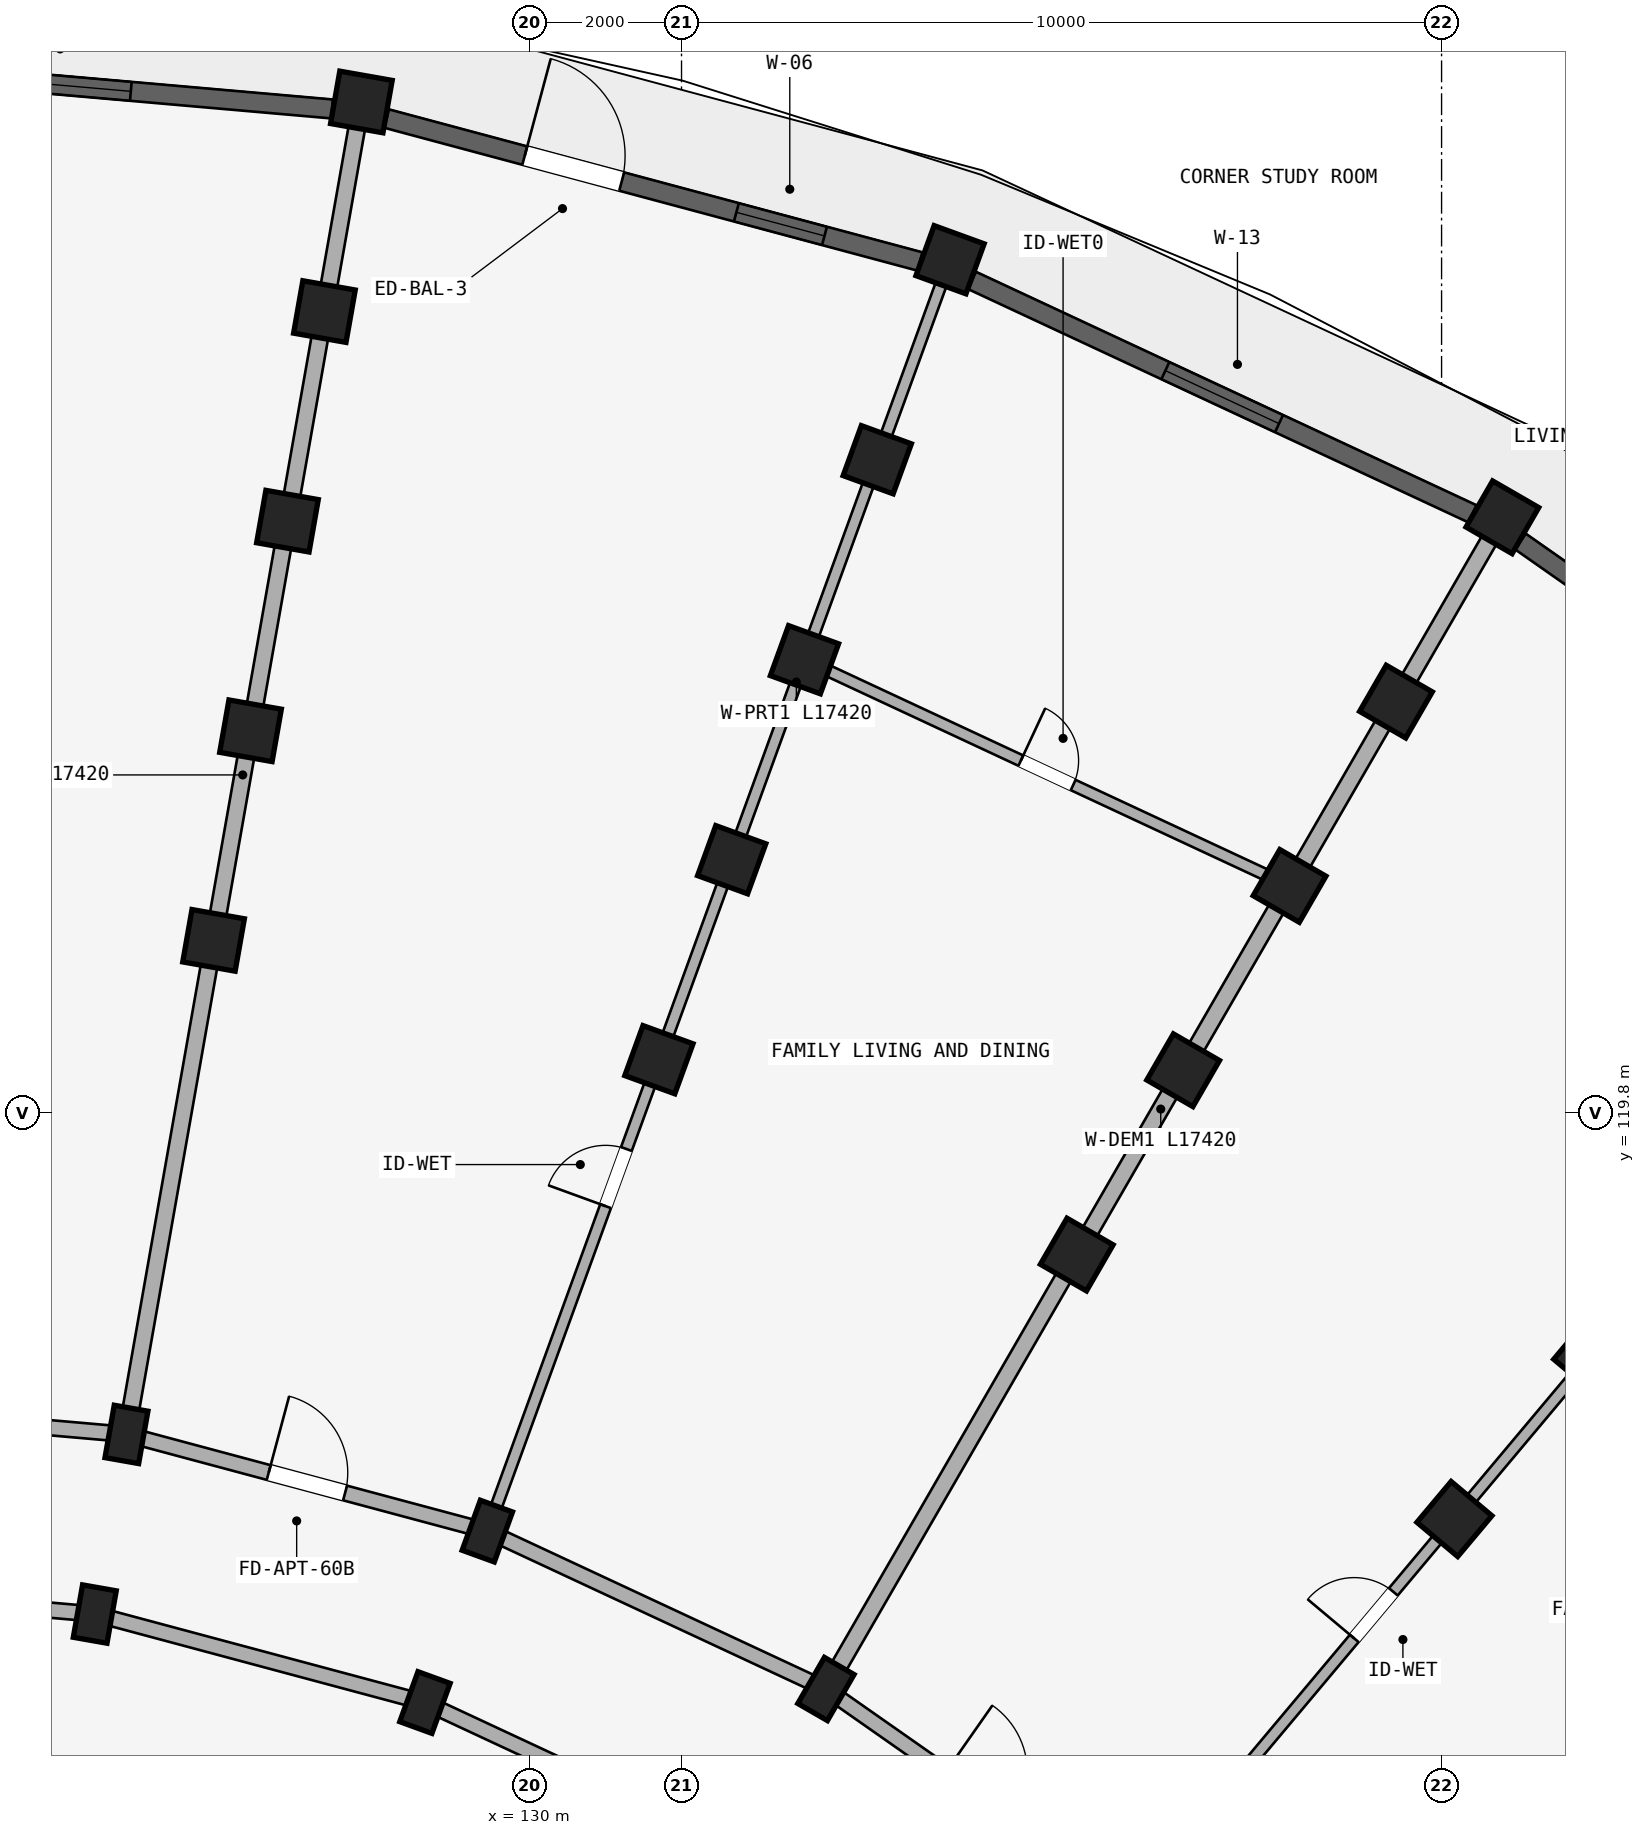
"""IFC4 building model, lengths in metres.
Left out: names, types, materials, properties, quantities, classifications, styles, units other than length and angle.
Written with IfcOpenShell. Run it as: python <this file> out.ifc"""

import sys

from ifc_helpers import new_model, si_unit, direction, frame, frame_2d, origin, origin_2d, place, context, subcontext, project, spatial, rectangle, extrude, element, fill, save


model = new_model("IFC4")
c1 = context("Model", 3, precision=1e-05, world=origin(), true_north=direction((0.0, 1.0)))
c2 = subcontext(c1, "Body", "Model", "MODEL_VIEW")
j1 = project(units=[si_unit("LENGTHUNIT", "METRE"), si_unit("PLANEANGLEUNIT", "RADIAN")], contexts=[c1])
p1 = place(None, origin())
s1 = spatial("IfcSite", under=j1, at=p1, CompositionType="ELEMENT")
p2 = place(p1, origin())
s2 = spatial("IfcBuilding", under=s1, at=p2, CompositionType="ELEMENT")
p3 = place(p2, frame((0.0, 0.0, 21.3)))
s3 = spatial("IfcBuildingStorey", under=s2, at=p3, CompositionType="ELEMENT", Elevation=21.3)
for number, where, z_axis, x_axis in (
    (1, (124.28, 113.208, 0.0), (0.0, 0.0, 1.0), (-0.985, 0.174, 0.0)),
    (2, (124.697, 115.572, 0.0), (0.0, 0.0, 1.0), (-0.985, 0.174, 0.0)),
):
    element("IfcColumn", number, at=place(p3, frame(where, z_axis=z_axis, x_axis=x_axis)), inside=s3, PredefinedType="COLUMN", context=c2, shape_type="SweptSolid", body=[
        extrude(rectangle(XDim=0.45, YDim=0.7, at=origin_2d()), origin(), (0.0, 0.0, 1.0), 2.93),
    ])
for number, where, z_axis, x_axis in (
    (3, (125.843, 122.071, 0.0), (0.0, 0.0, 1.0), (-0.985, 0.174, 0.0)),
    (4, (126.329, 124.829, 0.0), (0.0, 0.0, 1.0), (-0.985, 0.174, 0.0)),
    (5, (126.815, 127.586, 0.0), (0.0, 0.0, 1.0), (-0.985, 0.174, 0.0)),
    (6, (127.302, 130.344, 0.0), (0.0, 0.0, 1.0), (-0.985, 0.174, 0.0)),
    (7, (127.788, 133.101, 0.0), (0.0, 0.0, 1.0), (-0.985, 0.174, 0.0)),
):
    element("IfcColumn", number, at=place(p3, frame(where, z_axis=z_axis, x_axis=x_axis)), inside=s3, PredefinedType="COLUMN", context=c2, shape_type="SweptSolid", body=[
        extrude(rectangle(XDim=0.7, YDim=0.7, at=origin_2d()), origin(), (0.0, 0.0, 1.0), 2.93),
    ])
for number, where, z_axis, x_axis in (
    (8, (128.624, 112.044, 0.0), (0.0, 0.0, 1.0), (-0.94, 0.342, 0.0)),
    (9, (129.445, 114.299, 0.0), (0.0, 0.0, 1.0), (-0.94, 0.342, 0.0)),
):
    element("IfcColumn", number, at=place(p3, frame(where, z_axis=z_axis, x_axis=x_axis)), inside=s3, PredefinedType="COLUMN", context=c2, shape_type="SweptSolid", body=[
        extrude(rectangle(XDim=0.45, YDim=0.7, at=origin_2d()), origin(), (0.0, 0.0, 1.0), 2.93),
    ])
for number, where, z_axis, x_axis in (
    (10, (131.702, 120.501, 0.0), (0.0, 0.0, 1.0), (-0.94, 0.342, 0.0)),
    (11, (132.66, 123.132, 0.0), (0.0, 0.0, 1.0), (-0.94, 0.342, 0.0)),
    (12, (133.618, 125.764, 0.0), (0.0, 0.0, 1.0), (-0.94, 0.342, 0.0)),
    (13, (134.575, 128.395, 0.0), (0.0, 0.0, 1.0), (-0.94, 0.342, 0.0)),
    (14, (135.533, 131.026, 0.0), (0.0, 0.0, 1.0), (-0.94, 0.342, 0.0)),
):
    element("IfcColumn", number, at=place(p3, frame(where, z_axis=z_axis, x_axis=x_axis)), inside=s3, PredefinedType="COLUMN", context=c2, shape_type="SweptSolid", body=[
        extrude(rectangle(XDim=0.7, YDim=0.7, at=origin_2d()), origin(), (0.0, 0.0, 1.0), 2.93),
    ])
p4 = place(p3, frame((133.9, 112.222, 0.0), z_axis=(0.0, 0.0, 1.0), x_axis=(-0.866025403784, 0.5, 0.0)))
e15 = element("IfcColumn", 15, at=p4, inside=s3, PredefinedType="COLUMN", context=c2, shape_type="SweptSolid", body=[
    extrude(rectangle(XDim=0.45, YDim=0.7, at=origin_2d()), origin(), (0.0, 0.0, 1.0), 2.93),
])
for number, where, z_axis, x_axis in (
    (16, (137.2, 117.938, 0.0), (0.0, 0.0, 1.0), (-0.866, 0.5, 0.0)),
    (17, (138.6, 120.363, 0.0), (0.0, 0.0, 1.0), (-0.866, 0.5, 0.0)),
    (18, (140.0, 122.787, 0.0), (0.0, 0.0, 1.0), (-0.866, 0.5, 0.0)),
    (19, (141.4, 125.212, 0.0), (0.0, 0.0, 1.0), (-0.866, 0.5, 0.0)),
    (20, (142.8, 127.637, 0.0), (0.0, 0.0, 1.0), (-0.866, 0.5, 0.0)),
    (21, (142.169, 114.458, 0.0), (0.0, 0.0, 1.0), (-0.766, 0.643, 0.0)),
    (22, (143.969, 116.603, 0.0), (0.0, 0.0, 1.0), (-0.766, 0.643, 0.0)),
):
    element("IfcColumn", number, at=place(p3, frame(where, z_axis=z_axis, x_axis=x_axis)), inside=s3, PredefinedType="COLUMN", context=c2, shape_type="SweptSolid", body=[
        extrude(rectangle(XDim=0.7, YDim=0.7, at=origin_2d()), origin(), (0.0, 0.0, 1.0), 2.93),
    ])
p5 = place(p3, frame((119.8, 113.6, 0.0), z_axis=(0.0, 0.0, 1.0), x_axis=(0.996191949488, -0.087187153726, 0.0)))
e23 = element("IfcWall", 23, at=p5, inside=s3, PredefinedType="STANDARD", context=c2, shape_type="SweptSolid", body=[
    extrude(rectangle(XDim=4.497, YDim=0.2, at=frame_2d((2.249, 0.0))), origin(), (0.0, 0.0, 1.0), 2.372),
])
p6 = place(p5, frame((1.729, 0.0, 0.0)))
e24 = element("IfcOpeningElement", 24, at=p6, cuts=e23, PredefinedType="OPENING", context=c2, shape_type="SweptSolid", body=[
    extrude(rectangle(XDim=1.04, YDim=2.15, at=frame_2d((0.52, 1.075))), frame((0.0, 0.11, 0.0), z_axis=(0.0, -1.0, 0.0), x_axis=(1.0, 0.0, 0.0)), (0.0, 0.0, 1.0), 0.22),
])
p7 = place(p3, frame((119.8, 116.0, 0.0), z_axis=(0.0, 0.0, 1.0), x_axis=(0.996193663584, -0.087167566415, 0.0)))
e25 = element("IfcWall", 25, at=p7, inside=s3, PredefinedType="STANDARD", context=c2, shape_type="SweptSolid", body=[
    extrude(rectangle(XDim=4.916, YDim=0.2, at=frame_2d((2.458, 0.0))), origin(), (0.0, 0.0, 1.0), 2.372),
])
p8 = place(p7, frame((1.958, 0.0, 0.0)))
e26 = element("IfcOpeningElement", 26, at=p8, cuts=e25, PredefinedType="OPENING", context=c2, shape_type="SweptSolid", body=[
    extrude(rectangle(XDim=1.0, YDim=2.15, at=frame_2d((0.5, 1.075))), frame((0.0, 0.11, 0.0), z_axis=(0.0, -1.0, 0.0), x_axis=(1.0, 0.0, 0.0)), (0.0, 0.0, 1.0), 0.22),
])
p9 = place(p3, frame((124.28, 113.208, 0.0), z_axis=(0.0, 0.0, 1.0), x_axis=(0.965934240054, -0.258787642463, 0.0)))
e27 = element("IfcWall", 27, at=p9, inside=s3, PredefinedType="STANDARD", context=c2, shape_type="SweptSolid", body=[
    extrude(rectangle(XDim=4.497, YDim=0.2, at=frame_2d((2.249, 0.0))), origin(), (0.0, 0.0, 1.0), 2.372),
])
p10 = place(p3, frame((124.697, 115.572, 0.0), z_axis=(0.0, 0.0, 1.0), x_axis=(0.965930095386, -0.258803112091, 0.0)))
e28 = element("IfcWall", 28, at=p10, inside=s3, PredefinedType="STANDARD", context=c2, shape_type="SweptSolid", body=[
    extrude(rectangle(XDim=4.916, YDim=0.2, at=frame_2d((2.458, 0.0))), origin(), (0.0, 0.0, 1.0), 2.372),
])
p11 = place(p10, frame((1.938, 0.0, 0.0)))
e29 = element("IfcOpeningElement", 29, at=p11, cuts=e28, PredefinedType="OPENING", context=c2, shape_type="SweptSolid", body=[
    extrude(rectangle(XDim=1.04, YDim=2.15, at=frame_2d((0.52, 1.075))), frame((0.0, 0.11, 0.0), z_axis=(0.0, -1.0, 0.0), x_axis=(1.0, 0.0, 0.0)), (0.0, 0.0, 1.0), 0.22),
])
p12 = place(p3, frame((128.624, 112.044, 0.0), z_axis=(0.0, 0.0, 1.0), x_axis=(0.906307919131, -0.422617978463, 0.0)))
e30 = element("IfcWall", 30, at=p12, inside=s3, PredefinedType="STANDARD", context=c2, shape_type="SweptSolid", body=[
    extrude(rectangle(XDim=4.497, YDim=0.2, at=frame_2d((2.249, 0.0))), origin(), (0.0, 0.0, 1.0), 2.372),
])
p13 = place(p3, frame((129.445, 114.299, 0.0), z_axis=(0.0, 0.0, 1.0), x_axis=(0.906302381024, -0.422629854778, 0.0)))
e31 = element("IfcWall", 31, at=p13, inside=s3, PredefinedType="STANDARD", context=c2, shape_type="SweptSolid", body=[
    extrude(rectangle(XDim=4.915, YDim=0.2, at=frame_2d((2.458, 0.0))), origin(), (0.0, 0.0, 1.0), 2.372),
])
p14 = place(p3, frame((133.9, 112.222, 0.0), z_axis=(0.0, 0.0, 1.0), x_axis=(0.819140911474, -0.573592335331, 0.0)))
e32 = element("IfcWall", 32, at=p14, inside=s3, PredefinedType="STANDARD", context=c2, shape_type="SweptSolid", body=[
    extrude(rectangle(XDim=4.916, YDim=0.2, at=frame_2d((2.458, 0.0))), origin(), (0.0, 0.0, 1.0), 2.372),
])
p15 = place(p14, frame((1.918, 0.0, 0.0)))
e33 = element("IfcOpeningElement", 33, at=p15, cuts=e32, PredefinedType="OPENING", context=c2, shape_type="SweptSolid", body=[
    extrude(rectangle(XDim=1.08, YDim=2.15, at=frame_2d((0.54, 1.075))), frame((0.0, 0.11, 0.0), z_axis=(0.0, -1.0, 0.0), x_axis=(1.0, 0.0, 0.0)), (0.0, 0.0, 1.0), 0.22),
])
p16 = place(p3, frame((124.714, 115.67, 0.0), z_axis=(0.0, 0.0, 1.0), x_axis=(0.173646216546, 0.984808098809, 0.0)))
e34 = element("IfcWall", 34, at=p16, inside=s3, PredefinedType="STANDARD", context=c2, shape_type="SweptSolid", body=[
    extrude(rectangle(XDim=17.42, YDim=0.22, at=frame_2d((8.71, 0.0))), origin(), (0.0, 0.0, 1.0), 2.372),
])
p17 = place(p3, frame((129.479, 114.393, 0.0), z_axis=(0.0, 0.0, 1.0), x_axis=(0.342022120477, 0.939691901159, 0.0)))
e35 = element("IfcWall", 35, at=p17, inside=s3, PredefinedType="PARTITIONING", context=c2, shape_type="SweptSolid", body=[
    extrude(rectangle(XDim=17.42, YDim=0.15, at=frame_2d((8.71, 0.0))), origin(), (0.0, 0.0, 1.0), 2.372),
])
p18 = place(p17, frame((4.45, 0.0, 0.0)))
e36 = element("IfcOpeningElement", 36, at=p18, cuts=e35, PredefinedType="OPENING", context=c2, shape_type="SweptSolid", body=[
    extrude(rectangle(XDim=0.8, YDim=2.1, at=frame_2d((0.4, 1.05))), frame((0.0, 0.085, 0.0), z_axis=(0.0, -1.0, 0.0), x_axis=(1.0, 0.0, 0.0)), (0.0, 0.0, 1.0), 0.17),
])
p19 = place(p3, frame((133.95, 112.309, 0.0), z_axis=(0.0, 0.0, 1.0), x_axis=(0.499997843263, 0.866026648973, 0.0)))
e37 = element("IfcWall", 37, at=p19, inside=s3, PredefinedType="STANDARD", context=c2, shape_type="SweptSolid", body=[
    extrude(rectangle(XDim=17.42, YDim=0.22, at=frame_2d((8.71, 0.0))), origin(), (0.0, 0.0, 1.0), 2.372),
])
p20 = place(p3, frame((137.991, 109.479, 0.0), z_axis=(0.0, 0.0, 1.0), x_axis=(0.642784757967, 0.766046835987, 0.0)))
e38 = element("IfcWall", 38, at=p20, inside=s3, PredefinedType="PARTITIONING", context=c2, shape_type="SweptSolid", body=[
    extrude(rectangle(XDim=17.42, YDim=0.15, at=frame_2d((8.71, 0.0))), origin(), (0.0, 0.0, 1.0), 2.372),
])
p21 = place(p20, frame((4.45, 0.0, 0.0)))
e39 = element("IfcOpeningElement", 39, at=p21, cuts=e38, PredefinedType="OPENING", context=c2, shape_type="SweptSolid", body=[
    extrude(rectangle(XDim=0.8, YDim=2.1, at=frame_2d((0.4, 1.05))), frame((0.0, 0.085, 0.0), z_axis=(0.0, -1.0, 0.0), x_axis=(1.0, 0.0, 0.0)), (0.0, 0.0, 1.0), 0.17),
])
p22 = place(p3, frame((141.479, 105.991, 0.0), z_axis=(0.0, 0.0, 1.0), x_axis=(0.766046835987, 0.642784757967, 0.0)))
e40 = element("IfcWall", 40, at=p22, inside=s3, PredefinedType="STANDARD", context=c2, shape_type="SweptSolid", body=[
    extrude(rectangle(XDim=17.42, YDim=0.22, at=frame_2d((8.71, 0.0))), origin(), (0.0, 0.0, 1.0), 2.372),
])
p23 = place(p3, frame((133.618, 125.764, 0.0), z_axis=(0.0, 0.0, 1.0), x_axis=(0.906297360311, -0.422640621205, 0.0)))
e41 = element("IfcWall", 41, at=p23, inside=s3, PredefinedType="PLUMBINGWALL", context=c2, shape_type="SweptSolid", body=[
    extrude(rectangle(XDim=7.042, YDim=0.15, at=frame_2d((3.521, 0.0))), origin(), (0.0, 0.0, 1.0), 2.372),
])
p24 = place(p23, frame((3.141, 0.0, 0.0)))
e42 = element("IfcOpeningElement", 42, at=p24, cuts=e41, PredefinedType="OPENING", context=c2, shape_type="SweptSolid", body=[
    extrude(rectangle(XDim=0.76, YDim=2.05, at=frame_2d((0.38, 1.025))), frame((0.0, 0.085, 0.0), z_axis=(0.0, -1.0, 0.0), x_axis=(1.0, 0.0, 0.0)), (0.0, 0.0, 1.0), 0.17),
])
p25 = place(p3, frame((120.164, 133.643, 0.0), z_axis=(0.0, 0.0, 1.0), x_axis=(0.99619214922, -0.08718487158, 0.0)))
e43 = element("IfcWall", 43, at=p25, inside=s3, PredefinedType="STANDARD", context=c2, shape_type="SweptSolid", body=[
    extrude(rectangle(XDim=7.267, YDim=0.25, at=frame_2d((3.633, 0.0))), origin(), (0.0, 0.0, 1.0), 2.472),
])
p26 = place(p25, frame((2.658, 0.0, 0.422)))
e44 = element("IfcOpeningElement", 44, at=p26, cuts=e43, PredefinedType="OPENING", context=c2, shape_type="SweptSolid", body=[
    extrude(rectangle(XDim=1.95, YDim=1.85, at=frame_2d((0.975, 0.925))), frame((0.0, 0.135, 0.0), z_axis=(0.0, -1.0, 0.0), x_axis=(1.0, 0.0, 0.0)), (0.0, 0.0, 1.0), 0.27),
])
p27 = place(p3, frame((128.118, 132.883, 0.0), z_axis=(0.0, 0.0, 1.0), x_axis=(0.965930355787, -0.258802140196, 0.0)))
e45 = element("IfcWall", 45, at=p27, inside=s3, PredefinedType="STANDARD", context=c2, shape_type="SweptSolid", body=[
    extrude(rectangle(XDim=7.267, YDim=0.25, at=frame_2d((3.633, 0.0))), origin(), (0.0, 0.0, 1.0), 2.472),
])
p28 = place(p27, frame((4.766, 0.0, 0.622)))
e46 = element("IfcOpeningElement", 46, at=p28, cuts=e45, PredefinedType="OPENING", context=c2, shape_type="SweptSolid", body=[
    extrude(rectangle(XDim=1.2, YDim=1.5, at=frame_2d((0.6, 0.75))), frame((0.0, 0.135, 0.0), z_axis=(0.0, -1.0, 0.0), x_axis=(1.0, 0.0, 0.0)), (0.0, 0.0, 1.0), 0.27),
])
p29 = place(p27, frame((1.883, 0.0, 0.0)))
e47 = element("IfcOpeningElement", 47, at=p29, cuts=e45, PredefinedType="OPENING", context=c2, shape_type="SweptSolid", body=[
    extrude(rectangle(XDim=1.32, YDim=2.15, at=frame_2d((0.66, 1.075))), frame((0.0, 0.135, 0.0), z_axis=(0.0, -1.0, 0.0), x_axis=(1.0, 0.0, 0.0)), (0.0, 0.0, 1.0), 0.27),
])
p30 = place(p3, frame((135.821, 130.754, 0.0), z_axis=(0.0, 0.0, 1.0), x_axis=(0.90630327107, -0.422627946127, 0.0)))
e48 = element("IfcWall", 48, at=p30, inside=s3, PredefinedType="STANDARD", context=c2, shape_type="SweptSolid", body=[
    extrude(rectangle(XDim=7.267, YDim=0.25, at=frame_2d((3.633, 0.0))), origin(), (0.0, 0.0, 1.0), 2.472),
])
p31 = place(p30, frame((2.808, 0.0, 0.522)))
e49 = element("IfcOpeningElement", 49, at=p31, cuts=e48, PredefinedType="OPENING", context=c2, shape_type="SweptSolid", body=[
    extrude(rectangle(XDim=1.65, YDim=1.75, at=frame_2d((0.825, 0.875))), frame((0.0, 0.135, 0.0), z_axis=(0.0, -1.0, 0.0), x_axis=(1.0, 0.0, 0.0)), (0.0, 0.0, 1.0), 0.27),
])
p32 = place(p3, frame((143.036, 127.319, 0.0), z_axis=(0.0, 0.0, 1.0), x_axis=(0.819159308599, -0.573566061701, 0.0)))
e50 = element("IfcWall", 50, at=p32, inside=s3, PredefinedType="STANDARD", context=c2, shape_type="SweptSolid", body=[
    extrude(rectangle(XDim=7.267, YDim=0.25, at=frame_2d((3.633, 0.0))), origin(), (0.0, 0.0, 1.0), 2.472),
])
p33 = place(p32, frame((2.508, 0.0, 0.322)))
e51 = element("IfcOpeningElement", 51, at=p33, cuts=e50, PredefinedType="OPENING", context=c2, shape_type="SweptSolid", body=[
    extrude(rectangle(XDim=2.25, YDim=1.95, at=frame_2d((1.125, 0.975))), frame((0.0, 0.135, 0.0), z_axis=(0.0, -1.0, 0.0), x_axis=(1.0, 0.0, 0.0)), (0.0, 0.0, 1.0), 0.27),
])
p34 = place(p26, origin())
e52 = element("IfcWindow", 52, at=p34, inside=s3, PartitioningType="DOUBLE_PANEL_VERTICAL", PredefinedType="WINDOW", context=c2, shape_type="SweptSolid", body=[
    extrude(rectangle(XDim=1.95, YDim=1.85, at=frame_2d((0.975, 0.925))), frame((0.0, 0.03, 0.0), z_axis=(0.0, -1.0, 0.0), x_axis=(1.0, 0.0, 0.0)), (0.0, 0.0, 1.0), 0.06),
])
fill(e44, e52)
p35 = place(p28, origin())
e53 = element("IfcWindow", 53, at=p35, inside=s3, PartitioningType="SINGLE_PANEL", PredefinedType="WINDOW", context=c2, shape_type="SweptSolid", body=[
    extrude(rectangle(XDim=1.2, YDim=1.5, at=frame_2d((0.6, 0.75))), frame((0.0, 0.03, 0.0), z_axis=(0.0, -1.0, 0.0), x_axis=(1.0, 0.0, 0.0)), (0.0, 0.0, 1.0), 0.06),
])
fill(e46, e53)
p36 = place(p31, origin())
e54 = element("IfcWindow", 54, at=p36, inside=s3, PartitioningType="DOUBLE_PANEL_VERTICAL", PredefinedType="WINDOW", context=c2, shape_type="SweptSolid", body=[
    extrude(rectangle(XDim=1.65, YDim=1.75, at=frame_2d((0.825, 0.875))), frame((0.0, 0.03, 0.0), z_axis=(0.0, -1.0, 0.0), x_axis=(1.0, 0.0, 0.0)), (0.0, 0.0, 1.0), 0.06),
])
fill(e49, e54)
p37 = place(p18, frame((0.8, 0.0, 0.0), z_axis=(0.0, 0.0, 1.0), x_axis=(-1.0, 0.0, 0.0)))
e55 = element("IfcDoor", 55, at=p37, inside=s3, OperationType="SINGLE_SWING_RIGHT", PredefinedType="DOOR", context=c2, shape_type="SweptSolid", body=[
    extrude(rectangle(XDim=0.8, YDim=2.1, at=frame_2d((0.4, 1.05))), frame((0.0, 0.025, 0.0), z_axis=(0.0, -1.0, 0.0), x_axis=(1.0, 0.0, 0.0)), (0.0, 0.0, 1.0), 0.05),
])
fill(e36, e55)
p38 = place(p21, origin())
e56 = element("IfcDoor", 56, at=p38, inside=s3, OperationType="SINGLE_SWING_LEFT", PredefinedType="DOOR", context=c2, shape_type="SweptSolid", body=[
    extrude(rectangle(XDim=0.8, YDim=2.1, at=frame_2d((0.4, 1.05))), frame((0.0, 0.025, 0.0), z_axis=(0.0, -1.0, 0.0), x_axis=(1.0, 0.0, 0.0)), (0.0, 0.0, 1.0), 0.05),
])
fill(e39, e56)
p39 = place(p11, origin())
e57 = element("IfcDoor", 57, at=p39, inside=s3, OperationType="SINGLE_SWING_LEFT", PredefinedType="DOOR", context=c2, shape_type="SweptSolid", body=[
    extrude(rectangle(XDim=1.04, YDim=2.15, at=frame_2d((0.52, 1.075))), frame((0.0, 0.025, 0.0), z_axis=(0.0, -1.0, 0.0), x_axis=(1.0, 0.0, 0.0)), (0.0, 0.0, 1.0), 0.05),
])
fill(e29, e57)
p40 = place(p24, frame((0.76, 0.0, 0.0), z_axis=(0.0, 0.0, 1.0), x_axis=(-1.0, 0.0, 0.0)))
e58 = element("IfcDoor", 58, at=p40, inside=s3, OperationType="SINGLE_SWING_RIGHT", PredefinedType="DOOR", context=c2, shape_type="SweptSolid", body=[
    extrude(rectangle(XDim=0.76, YDim=2.05, at=frame_2d((0.38, 1.025))), frame((0.0, 0.025, 0.0), z_axis=(0.0, -1.0, 0.0), x_axis=(1.0, 0.0, 0.0)), (0.0, 0.0, 1.0), 0.05),
])
fill(e42, e58)
p41 = place(p29, origin())
e59 = element("IfcDoor", 59, at=p41, inside=s3, OperationType="SINGLE_SWING_LEFT", PredefinedType="DOOR", context=c2, shape_type="SweptSolid", body=[
    extrude(rectangle(XDim=1.32, YDim=2.15, at=frame_2d((0.66, 1.075))), frame((0.0, 0.025, 0.0), z_axis=(0.0, -1.0, 0.0), x_axis=(1.0, 0.0, 0.0)), (0.0, 0.0, 1.0), 0.05),
])
fill(e47, e59)
save(model, sys.argv[1])
